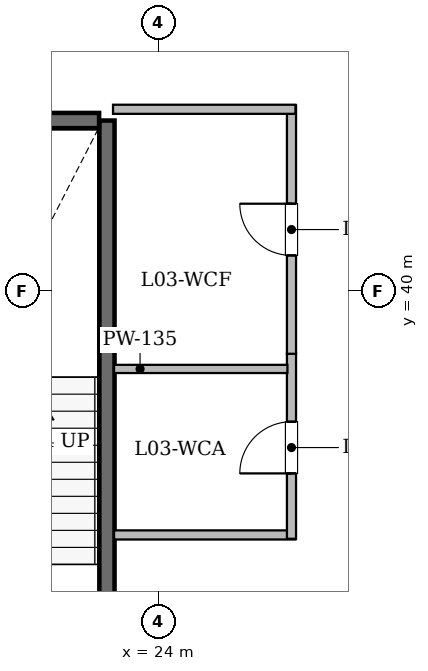
"""IFC4 building model, lengths in metres.
Left out: names, types, materials, properties, quantities, classifications, styles, units other than length and angle.
Written with IfcOpenShell. Run it as: python <this file> out.ifc"""

import sys

from ifc_helpers import new_model, si_unit, direction, frame, frame_2d, origin, place, context, subcontext, project, spatial, rectangle, extrude, element, fill, save


model = new_model("IFC4")
c1 = context("Model", 3, precision=1e-05, world=origin(), true_north=direction((0.0, 1.0)))
c2 = subcontext(c1, "Body", "Model", "MODEL_VIEW")
j1 = project(units=[si_unit("LENGTHUNIT", "METRE"), si_unit("PLANEANGLEUNIT", "RADIAN")], contexts=[c1])
p1 = place(None, origin())
s1 = spatial("IfcSite", under=j1, at=p1, CompositionType="ELEMENT")
p2 = place(p1, origin())
s2 = spatial("IfcBuilding", under=s1, at=p2, CompositionType="ELEMENT")
p3 = place(p2, frame((0.0, 0.0, 16.2)))
s3 = spatial("IfcBuildingStorey", under=s2, at=p3, CompositionType="ELEMENT", Elevation=16.2)
p4 = place(p3, frame((23.15, 33.6, 0.0), z_axis=(0.0, 0.0, 1.0), x_axis=(0.0, 1.0, 0.0)))
e1 = element("IfcWall", 1, at=p4, inside=s3, PredefinedType="SHEAR", context=c2, shape_type="SweptSolid", body=[
    extrude(rectangle(XDim=9.2, YDim=0.25, at=frame_2d((4.6, 0.0))), origin(), (0.0, 0.0, 1.0), 3.92),
])
p5 = place(p4, frame((0.4, 0.0, 0.0)))
e2 = element("IfcOpeningElement", 2, at=p5, cuts=e1, PredefinedType="OPENING", context=c2, shape_type="SweptSolid", body=[
    extrude(rectangle(XDim=1.0, YDim=2.15, at=frame_2d((0.5, 1.075))), frame((0.0, 0.135, 0.0), z_axis=(0.0, -1.0, 0.0), x_axis=(1.0, 0.0, 0.0)), (0.0, 0.0, 1.0), 0.27),
])
p6 = place(p3, frame((19.329, 42.8, 0.0), z_axis=(0.0, 0.0, 1.0), x_axis=(1.0, 0.0, 0.0)))
e3 = element("IfcWall", 3, at=p6, inside=s3, PredefinedType="SHEAR", context=c2, shape_type="SweptSolid", body=[
    extrude(rectangle(XDim=3.692, YDim=0.25, at=frame_2d((1.846, 0.0))), origin(), (0.0, 0.0, 1.0), 3.92),
])
p7 = place(p3, frame((23.267, 35.985, 0.0), z_axis=(0.0, 0.0, 1.0), x_axis=(1.0, 0.0, 0.0)))
e4 = element("IfcWall", 4, at=p7, inside=s3, PredefinedType="STANDARD", context=c2, shape_type="SweptSolid", body=[
    extrude(rectangle(XDim=2.983, YDim=0.15, at=frame_2d((1.491, 0.0))), origin(), (0.0, 0.0, 1.0), 3.92),
])
p8 = place(p3, frame((26.185, 35.922, 0.0), z_axis=(0.0, 0.0, 1.0), x_axis=(0.0, 1.0, 0.0)))
e5 = element("IfcWall", 5, at=p8, inside=s3, PredefinedType="STANDARD", context=c2, shape_type="SweptSolid", body=[
    extrude(rectangle(XDim=3.042, YDim=0.15, at=frame_2d((1.521, 0.0))), origin(), (0.0, 0.0, 1.0), 3.92),
])
p9 = place(p8, frame((1.075, 0.0, 0.0)))
e6 = element("IfcOpeningElement", 6, at=p9, cuts=e5, PredefinedType="OPENING", context=c2, shape_type="SweptSolid", body=[
    extrude(rectangle(XDim=0.85, YDim=2.1, at=frame_2d((0.425, 1.05))), frame((0.0, 0.085, 0.0), z_axis=(0.0, -1.0, 0.0), x_axis=(1.0, 0.0, 0.0)), (0.0, 0.0, 1.0), 0.17),
])
p10 = place(p3, frame((26.185, 38.964, 0.0), z_axis=(0.0, 0.0, 1.0), x_axis=(0.0, 1.0, 0.0)))
e7 = element("IfcWall", 7, at=p10, inside=s3, PredefinedType="STANDARD", context=c2, shape_type="SweptSolid", body=[
    extrude(rectangle(XDim=4.086, YDim=0.15, at=frame_2d((2.043, 0.0))), origin(), (0.0, 0.0, 1.0), 3.92),
])
p11 = place(p10, frame((1.618, 0.0, 0.0)))
e8 = element("IfcOpeningElement", 8, at=p11, cuts=e7, PredefinedType="OPENING", context=c2, shape_type="SweptSolid", body=[
    extrude(rectangle(XDim=0.85, YDim=2.1, at=frame_2d((0.425, 1.05))), frame((0.0, 0.085, 0.0), z_axis=(0.0, -1.0, 0.0), x_axis=(1.0, 0.0, 0.0)), (0.0, 0.0, 1.0), 0.17),
])
p12 = place(p3, frame((26.25, 42.985, 0.0), z_axis=(0.0, 0.0, 1.0), x_axis=(-1.0, 0.0, 0.0)))
e9 = element("IfcWall", 9, at=p12, inside=s3, PredefinedType="STANDARD", context=c2, shape_type="SweptSolid", body=[
    extrude(rectangle(XDim=3.0, YDim=0.15, at=frame_2d((1.5, 0.0))), origin(), (0.0, 0.0, 1.0), 3.92),
])
p13 = place(p3, frame((23.267, 38.715, 0.0), z_axis=(0.0, 0.0, 1.0), x_axis=(1.0, 0.0, 0.0)))
e10 = element("IfcWall", 10, at=p13, inside=s3, PredefinedType="PARTITIONING", context=c2, shape_type="SweptSolid", body=[
    extrude(rectangle(XDim=2.851, YDim=0.135, at=frame_2d((1.425, 0.0))), origin(), (0.0, 0.0, 1.0), 3.92),
])
p14 = place(p9, origin())
e11 = element("IfcDoor", 11, at=p14, inside=s3, OperationType="SINGLE_SWING_LEFT", PredefinedType="DOOR", context=c2, shape_type="SweptSolid", body=[
    extrude(rectangle(XDim=0.85, YDim=2.1, at=frame_2d((0.425, 1.05))), frame((0.0, 0.025, 0.0), z_axis=(0.0, -1.0, 0.0), x_axis=(1.0, 0.0, 0.0)), (0.0, 0.0, 1.0), 0.05),
])
fill(e6, e11)
p15 = place(p11, origin())
e12 = element("IfcDoor", 12, at=p15, inside=s3, OperationType="SINGLE_SWING_RIGHT", PredefinedType="DOOR", context=c2, shape_type="SweptSolid", body=[
    extrude(rectangle(XDim=0.85, YDim=2.1, at=frame_2d((0.425, 1.05))), frame((0.0, 0.025, 0.0), z_axis=(0.0, -1.0, 0.0), x_axis=(1.0, 0.0, 0.0)), (0.0, 0.0, 1.0), 0.05),
])
fill(e8, e12)
save(model, sys.argv[1])
